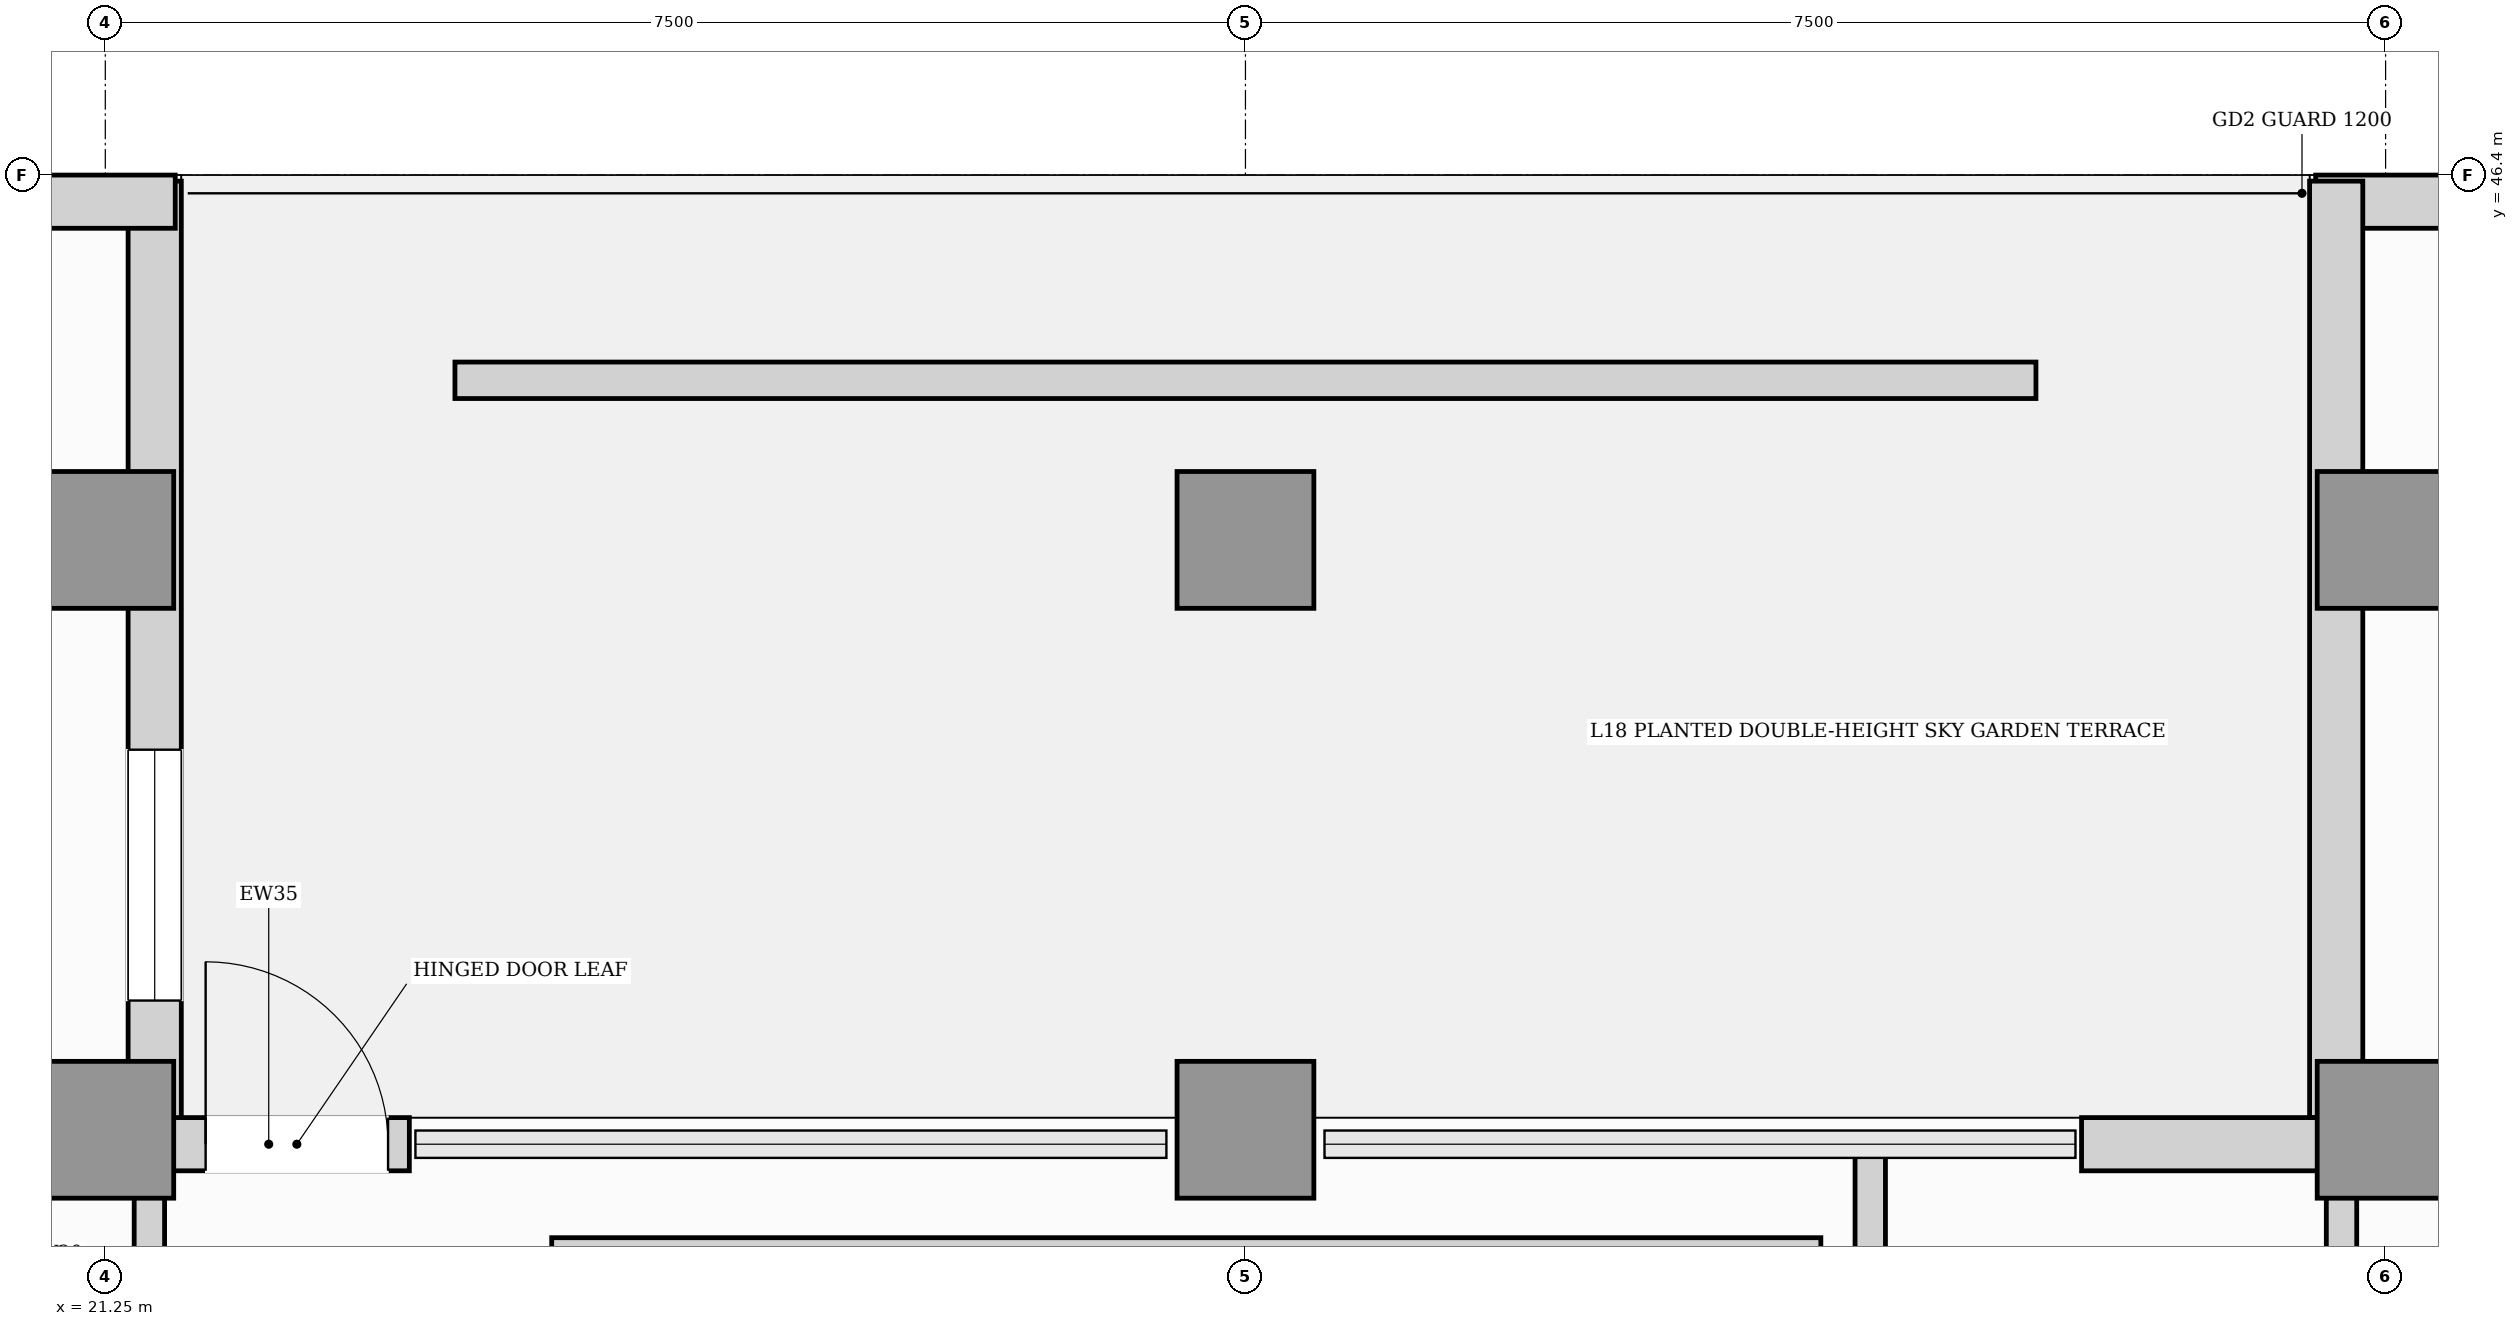
"""IFC4 building model, lengths in metres.
Left out: names, types, materials, properties, quantities, classifications, styles, units other than length and angle.
Written with IfcOpenShell. Run it as: python <this file> out.ifc"""

import sys

from ifc_helpers import new_model, si_unit, direction, frame, frame_2d, origin, origin_2d, place, context, subcontext, project, spatial, rectangle, extrude, element, fill, save


model = new_model("IFC4")
c1 = context("Model", 3, precision=1e-05, world=origin(), true_north=direction((0.0, 1.0)))
c2 = subcontext(c1, "Body", "Model", "MODEL_VIEW")
j1 = project(units=[si_unit("LENGTHUNIT", "METRE"), si_unit("PLANEANGLEUNIT", "RADIAN")], contexts=[c1])
p1 = place(None, origin())
s1 = spatial("IfcSite", under=j1, at=p1, CompositionType="ELEMENT")
p2 = place(p1, origin())
s2 = spatial("IfcBuilding", under=s1, at=p2, CompositionType="ELEMENT")
p3 = place(p2, frame((0.0, 0.0, 76.0)))
s3 = spatial("IfcBuildingStorey", under=s2, at=p3, CompositionType="ELEMENT", Elevation=76.0)
for number, where, z_axis, x_axis in (
    (1, (21.25, 44.0, 0.0), (0.0, 0.0, 1.0), (1.0, 0.0, 0.0)),
    (2, (28.75, 44.0, 0.0), (0.0, 0.0, 1.0), (1.0, 0.0, 0.0)),
    (3, (36.25, 44.0, 0.0), (0.0, 0.0, 1.0), (1.0, 0.0, 0.0)),
    (4, (21.25, 40.12, 0.0), (0.0, 0.0, 1.0), (1.0, 0.0, 0.0)),
    (5, (28.75, 40.12, 0.0), (0.0, 0.0, 1.0), (1.0, 0.0, 0.0)),
    (6, (36.25, 40.12, 0.0), (0.0, 0.0, 1.0), (1.0, 0.0, 0.0)),
):
    element("IfcColumn", number, at=place(p3, frame(where, z_axis=z_axis, x_axis=x_axis)), inside=s3, PredefinedType="COLUMN", context=c2, shape_type="SweptSolid", body=[
        extrude(rectangle(XDim=0.9, YDim=0.9, at=origin_2d()), origin(), (0.0, 0.0, 1.0), 5.05),
    ])
p4 = place(p3, frame((54.26, 46.225, 0.0), z_axis=(0.0, 0.0, 1.0), x_axis=(-1.0, 0.0, 0.0)))
e7 = element("IfcWall", 7, at=p4, inside=s3, PredefinedType="SOLIDWALL", context=c2, shape_type="SweptSolid", body=[
    extrude(rectangle(XDim=18.47, YDim=0.35, at=frame_2d((9.235, 0.0))), origin(), (0.0, 0.0, 1.0), 4.8),
])
p5 = place(p4, frame((14.207, 0.0, 0.88)))
e8 = element("IfcOpeningElement", 8, at=p5, cuts=e7, PredefinedType="OPENING", context=c2, shape_type="SweptSolid", body=[
    extrude(rectangle(XDim=1.65, YDim=2.0, at=frame_2d((0.825, 1.0))), frame((0.0, 0.185, 0.0), z_axis=(0.0, -1.0, 0.0), x_axis=(1.0, 0.0, 0.0)), (0.0, 0.0, 1.0), 0.37),
])
p6 = place(p4, frame((9.964, 0.0, 0.88)))
e9 = element("IfcOpeningElement", 9, at=p6, cuts=e7, PredefinedType="OPENING", context=c2, shape_type="SweptSolid", body=[
    extrude(rectangle(XDim=1.65, YDim=2.0, at=frame_2d((0.825, 1.0))), frame((0.0, 0.185, 0.0), z_axis=(0.0, -1.0, 0.0), x_axis=(1.0, 0.0, 0.0)), (0.0, 0.0, 1.0), 0.37),
])
p7 = place(p3, frame((35.925, 46.36, 0.0), z_axis=(0.0, 0.0, 1.0), x_axis=(0.0, -1.0, 0.0)))
e10 = element("IfcWall", 10, at=p7, inside=s3, PredefinedType="SOLIDWALL", context=c2, shape_type="SweptSolid", body=[
    extrude(rectangle(XDim=6.16, YDim=0.35, at=frame_2d((3.08, 0.0))), origin(), (0.0, 0.0, 1.0), 4.8),
])
p8 = place(p3, frame((21.4, 40.025, 0.0), z_axis=(0.0, 0.0, 1.0), x_axis=(1.0, 0.0, 0.0)))
e11 = element("IfcWall", 11, at=p8, inside=s3, PredefinedType="SOLIDWALL", context=c2, shape_type="SweptSolid", body=[
    extrude(rectangle(XDim=1.85, YDim=0.35, at=frame_2d((0.925, 0.0))), origin(), (0.0, 0.0, 1.0), 4.8),
])
p9 = place(p8, frame((0.51, 0.0, 0.0)))
e12 = element("IfcOpeningElement", 12, at=p9, cuts=e11, PredefinedType="OPENING", context=c2, shape_type="SweptSolid", body=[
    extrude(rectangle(XDim=1.2, YDim=2.2, at=frame_2d((0.6, 1.1))), frame((0.0, 0.185, 0.0), z_axis=(0.0, -1.0, 0.0), x_axis=(1.0, 0.0, 0.0)), (0.0, 0.0, 1.0), 0.37),
])
p10 = place(p3, frame((34.25, 40.025, 0.0), z_axis=(0.0, 0.0, 1.0), x_axis=(1.0, 0.0, 0.0)))
e13 = element("IfcWall", 13, at=p10, inside=s3, PredefinedType="SOLIDWALL", context=c2, shape_type="SweptSolid", body=[
    extrude(rectangle(XDim=1.85, YDim=0.35, at=frame_2d((0.925, 0.0))), origin(), (0.0, 0.0, 1.0), 4.8),
])
p11 = place(p3, frame((21.575, 40.2, 0.0), z_axis=(0.0, 0.0, 1.0), x_axis=(0.0, 1.0, 0.0)))
e14 = element("IfcWall", 14, at=p11, inside=s3, PredefinedType="SOLIDWALL", context=c2, shape_type="SweptSolid", body=[
    extrude(rectangle(XDim=6.16, YDim=0.35, at=frame_2d((3.08, 0.0))), origin(), (0.0, 0.0, 1.0), 4.8),
])
p12 = place(p11, frame((0.77, 0.0, 0.88)))
e15 = element("IfcOpeningElement", 15, at=p12, cuts=e14, PredefinedType="OPENING", context=c2, shape_type="SweptSolid", body=[
    extrude(rectangle(XDim=1.65, YDim=2.0, at=frame_2d((0.825, 1.0))), frame((0.0, 0.185, 0.0), z_axis=(0.0, -1.0, 0.0), x_axis=(1.0, 0.0, 0.0)), (0.0, 0.0, 1.0), 0.37),
])
p13 = place(p3, frame((21.71, 46.225, 0.0), z_axis=(0.0, 0.0, 1.0), x_axis=(-1.0, 0.0, 0.0)))
e16 = element("IfcWall", 16, at=p13, inside=s3, PredefinedType="SOLIDWALL", context=c2, shape_type="SweptSolid", body=[
    extrude(rectangle(XDim=18.47, YDim=0.35, at=frame_2d((9.235, 0.0))), origin(), (0.0, 0.0, 1.0), 4.8),
])
p14 = place(p13, frame((13.367, 0.0, 0.85)))
e17 = element("IfcOpeningElement", 17, at=p14, cuts=e16, PredefinedType="OPENING", context=c2, shape_type="SweptSolid", body=[
    extrude(rectangle(XDim=2.4, YDim=2.0, at=frame_2d((1.2, 1.0))), frame((0.0, 0.185, 0.0), z_axis=(0.0, -1.0, 0.0), x_axis=(1.0, 0.0, 0.0)), (0.0, 0.0, 1.0), 0.37),
])
p15 = place(p13, frame((7.102, 0.0, 0.88)))
e18 = element("IfcOpeningElement", 18, at=p15, cuts=e16, PredefinedType="OPENING", context=c2, shape_type="SweptSolid", body=[
    extrude(rectangle(XDim=1.65, YDim=2.0, at=frame_2d((0.825, 1.0))), frame((0.0, 0.185, 0.0), z_axis=(0.0, -1.0, 0.0), x_axis=(1.0, 0.0, 0.0)), (0.0, 0.0, 1.0), 0.37),
])
p16 = place(p13, frame((3.696, 0.0, 0.88)))
e19 = element("IfcOpeningElement", 19, at=p16, cuts=e16, PredefinedType="OPENING", context=c2, shape_type="SweptSolid", body=[
    extrude(rectangle(XDim=1.65, YDim=2.0, at=frame_2d((0.825, 1.0))), frame((0.0, 0.185, 0.0), z_axis=(0.0, -1.0, 0.0), x_axis=(1.0, 0.0, 0.0)), (0.0, 0.0, 1.0), 0.37),
])
p17 = place(p3, frame((23.55, 45.05, 0.0), z_axis=(0.0, 0.0, 1.0), x_axis=(1.0, 0.0, 0.0)))
e20 = element("IfcWall", 20, at=p17, inside=s3, PredefinedType="PARAPET", context=c2, shape_type="SweptSolid", body=[
    extrude(rectangle(XDim=10.4, YDim=0.24, at=frame_2d((5.2, 0.0))), origin(), (0.0, 0.0, 1.0), 0.55),
])
p18 = place(p3, frame((32.86, 17.585, 0.0), z_axis=(0.0, 0.0, 1.0), x_axis=(0.0, 1.0, 0.0)))
e21 = element("IfcWall", 21, at=p18, inside=s3, PredefinedType="PARTITIONING", context=c2, shape_type="SweptSolid", body=[
    extrude(rectangle(XDim=22.422, YDim=0.2, at=frame_2d((11.211, 0.0))), origin(), (0.0, 0.0, 1.0), 4.8),
])
p19 = place(p18, frame((10.751, 0.0, 0.0)))
e22 = element("IfcOpeningElement", 22, at=p19, cuts=e21, PredefinedType="OPENING", context=c2, shape_type="SweptSolid", body=[
    extrude(rectangle(XDim=0.92, YDim=2.1, at=frame_2d((0.46, 1.05))), frame((0.0, 0.11, 0.0), z_axis=(0.0, -1.0, 0.0), x_axis=(1.0, 0.0, 0.0)), (0.0, 0.0, 1.0), 0.22),
])
for number, where, z_axis, x_axis in (
    (23, (21.54, 38.615, 0.0), (0.0, 0.0, 1.0), (0.0, 1.0, 0.0)),
    (24, (35.96, 38.615, 0.0), (0.0, 0.0, 1.0), (0.0, 1.0, 0.0)),
):
    element("IfcWall", number, at=place(p3, frame(where, z_axis=z_axis, x_axis=x_axis)), inside=s3, PredefinedType="PARTITIONING", context=c2, shape_type="SweptSolid", body=[
        extrude(rectangle(XDim=1.375, YDim=0.2, at=frame_2d((0.688, 0.0))), origin(), (0.0, 0.0, 1.0), 4.8),
    ])
p20 = place(p3, frame((18.738, 40.12, 0.0), z_axis=(0.0, 0.0, 1.0), x_axis=(1.0, 0.0, 0.0)))
e25 = element("IfcWall", 25, at=p20, inside=s3, PredefinedType="PARTITIONING", context=c2, shape_type="SweptSolid", body=[
    extrude(rectangle(XDim=2.656, YDim=0.15, at=frame_2d((1.328, 0.0))), origin(), (0.0, 0.0, 1.0), 4.8),
])
p21 = place(p20, frame((0.868, 0.0, 0.0)))
e26 = element("IfcOpeningElement", 26, at=p21, cuts=e25, PredefinedType="OPENING", context=c2, shape_type="SweptSolid", body=[
    extrude(rectangle(XDim=0.92, YDim=2.1, at=frame_2d((0.46, 1.05))), frame((0.0, 0.085, 0.0), z_axis=(0.0, -1.0, 0.0), x_axis=(1.0, 0.0, 0.0)), (0.0, 0.0, 1.0), 0.17),
])
p22 = place(p3, frame((36.107, 40.12, 0.0), z_axis=(0.0, 0.0, 1.0), x_axis=(1.0, 0.0, 0.0)))
e27 = element("IfcWall", 27, at=p22, inside=s3, PredefinedType="PARTITIONING", context=c2, shape_type="SweptSolid", body=[
    extrude(rectangle(XDim=5.23, YDim=0.15, at=frame_2d((2.615, 0.0))), origin(), (0.0, 0.0, 1.0), 4.8),
])
p23 = place(p22, frame((2.155, 0.0, 0.0)))
e28 = element("IfcOpeningElement", 28, at=p23, cuts=e27, PredefinedType="OPENING", context=c2, shape_type="SweptSolid", body=[
    extrude(rectangle(XDim=0.92, YDim=2.1, at=frame_2d((0.46, 1.05))), frame((0.0, 0.085, 0.0), z_axis=(0.0, -1.0, 0.0), x_axis=(1.0, 0.0, 0.0)), (0.0, 0.0, 1.0), 0.17),
])
p24 = place(p3, frame((24.187, 39.32, 0.0), z_axis=(0.0, 0.0, 1.0), x_axis=(1.0, 0.0, 0.0)))
e29 = element("IfcWall", 29, at=p24, inside=s3, PredefinedType="PARTITIONING", context=c2, shape_type="SweptSolid", body=[
    extrude(rectangle(XDim=8.348, YDim=0.18, at=frame_2d((4.174, 0.0))), origin(), (0.0, 0.0, 1.0), 4.8),
])
p25 = place(p9, origin())
e30 = element("IfcDoor", 30, at=p25, inside=s3, OperationType="SINGLE_SWING_LEFT", PredefinedType="DOOR", context=c2, shape_type="SweptSolid", body=[
    extrude(rectangle(XDim=1.2, YDim=2.2, at=frame_2d((0.6, 1.1))), frame((0.0, 0.025, 0.0), z_axis=(0.0, -1.0, 0.0), x_axis=(1.0, 0.0, 0.0)), (0.0, 0.0, 1.0), 0.05),
])
fill(e12, e30)
p26 = place(p12, origin())
e31 = element("IfcWindow", 31, at=p26, inside=s3, PartitioningType="SINGLE_PANEL", PredefinedType="WINDOW", context=c2, shape_type="SweptSolid", body=[
    extrude(rectangle(XDim=1.65, YDim=2.0, at=frame_2d((0.825, 1.0))), frame((0.0, 0.03, 0.0), z_axis=(0.0, -1.0, 0.0), x_axis=(1.0, 0.0, 0.0)), (0.0, 0.0, 1.0), 0.06),
])
fill(e15, e31)
save(model, sys.argv[1])
